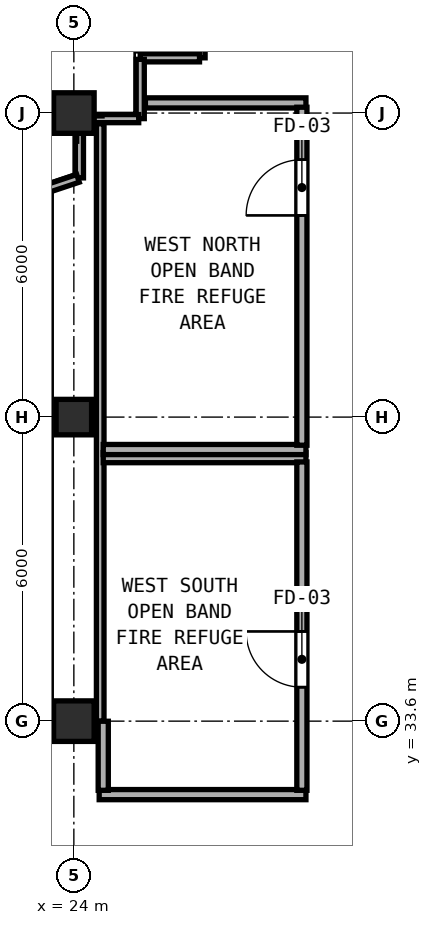
"""IFC4 building model, lengths in metres.
Left out: names, types, materials, properties, quantities, classifications, styles, units other than length and angle.
Written with IfcOpenShell. Run it as: python <this file> out.ifc"""

import sys

from ifc_helpers import new_model, si_unit, direction, frame, frame_2d, origin, origin_2d, place, context, subcontext, project, spatial, rectangle, hollow_rectangle, extrude, element, fill, save


model = new_model("IFC4")
c1 = context("Model", 3, precision=1e-05, world=origin(), true_north=direction((0.0, 1.0)))
c2 = subcontext(c1, "Body", "Model", "MODEL_VIEW")
j1 = project(units=[si_unit("LENGTHUNIT", "METRE"), si_unit("PLANEANGLEUNIT", "RADIAN")], contexts=[c1])
p1 = place(None, origin())
s1 = spatial("IfcSite", under=j1, at=p1, CompositionType="ELEMENT")
p2 = place(p1, origin())
s2 = spatial("IfcBuilding", under=s1, at=p2, CompositionType="ELEMENT")
p3 = place(p2, frame((0.0, 0.0, 277.55)))
s3 = spatial("IfcBuildingStorey", under=s2, at=p3, CompositionType="ELEMENT", Elevation=277.55)
for number, where, z_axis, x_axis in (
    (1, (24.0, 33.6, 0.0), (0.0, 0.0, 1.0), (1.0, 0.0, 0.0)),
    (2, (24.0, 45.6, 0.0), (0.0, 0.0, 1.0), (1.0, 0.0, 0.0)),
):
    element("IfcColumn", number, at=place(p3, frame(where, z_axis=z_axis, x_axis=x_axis)), inside=s3, PredefinedType="COLUMN", context=c2, shape_type="SweptSolid", body=[
        extrude(hollow_rectangle(XDim=0.8, YDim=0.8, WallThickness=0.03, at=origin_2d()), origin(), (0.0, 0.0, 1.0), 4.65),
    ])
p4 = place(p3, frame((24.0, 39.6, 0.0), z_axis=(0.0, 0.0, 1.0), x_axis=(1.0, 0.0, 0.0)))
e3 = element("IfcColumn", 3, at=p4, inside=s3, PredefinedType="COLUMN", context=c2, shape_type="SweptSolid", body=[
    extrude(hollow_rectangle(XDim=0.7, YDim=0.7, WallThickness=0.026, at=origin_2d()), origin(), (0.0, 0.0, 1.0), 4.65),
])
p5 = place(p3, frame((26.51, 47.93, 0.0), z_axis=(0.0, 0.0, 1.0), x_axis=(0.0, -1.0, 0.0)))
e4 = element("IfcWall", 4, at=p5, inside=s3, PredefinedType="PARAPET", context=c2, shape_type="SweptSolid", body=[
    extrude(rectangle(XDim=1.24, YDim=0.16, at=frame_2d((0.62, 0.0))), origin(), (0.0, 0.0, 1.0), 1.15),
])
for number, where, z_axis, x_axis in (
    (5, (26.48, 46.69, 0.0), (0.0, 0.0, 1.0), (-1.0, 0.0, 0.0)),
    (6, (25.31, 46.66, 0.0), (0.0, 0.0, 1.0), (0.0, -1.0, 0.0)),
):
    element("IfcWall", number, at=place(p3, frame(where, z_axis=z_axis, x_axis=x_axis)), inside=s3, PredefinedType="PARAPET", context=c2, shape_type="SweptSolid", body=[
        extrude(rectangle(XDim=1.17, YDim=0.16, at=frame_2d((0.585, 0.0))), origin(), (0.0, 0.0, 1.0), 1.15),
    ])
p6 = place(p3, frame((25.28, 45.49, 0.0), z_axis=(0.0, 0.0, 1.0), x_axis=(-1.0, 0.0, 0.0)))
e7 = element("IfcWall", 7, at=p6, inside=s3, PredefinedType="PARAPET", context=c2, shape_type="SweptSolid", body=[
    extrude(rectangle(XDim=0.888, YDim=0.16, at=frame_2d((0.444, 0.0))), origin(), (0.0, 0.0, 1.0), 1.15),
])
p7 = place(p3, frame((24.11, 45.208, 0.0), z_axis=(0.0, 0.0, 1.0), x_axis=(0.0, -1.0, 0.0)))
e8 = element("IfcWall", 8, at=p7, inside=s3, PredefinedType="PARAPET", context=c2, shape_type="SweptSolid", body=[
    extrude(rectangle(XDim=0.887, YDim=0.16, at=frame_2d((0.444, 0.0))), origin(), (0.0, 0.0, 1.0), 1.15),
])
p8 = place(p3, frame((24.082, 44.311, 0.0), z_axis=(0.0, 0.0, 1.0), x_axis=(-0.948687218335, -0.316216004921, 0.0)))
e9 = element("IfcWall", 9, at=p8, inside=s3, PredefinedType="PARAPET", context=c2, shape_type="SweptSolid", body=[
    extrude(rectangle(XDim=6.228, YDim=0.16, at=frame_2d((3.114, 0.0))), origin(), (0.0, 0.0, 1.0), 1.15),
])
p9 = place(p3, frame((24.52, 33.6, 0.0), z_axis=(0.0, 0.0, 1.0), x_axis=(0.0, 1.0, 0.0)))
e10 = element("IfcWall", 10, at=p9, inside=s3, PredefinedType="PARTITIONING", context=c2, shape_type="SweptSolid", body=[
    extrude(rectangle(XDim=11.788, YDim=0.15, at=frame_2d((5.894, 0.0))), origin(), (0.0, 0.0, 1.0), 4.4),
])
p10 = place(p3, frame((24.58, 38.8, 0.0), z_axis=(0.0, 0.0, 1.0), x_axis=(1.0, 0.0, 0.0)))
e11 = element("IfcWall", 11, at=p10, inside=s3, PredefinedType="SOLIDWALL", context=c2, shape_type="SweptSolid", body=[
    extrude(rectangle(XDim=4.0, YDim=0.2, at=frame_2d((2.0, 0.0))), origin(), (0.0, 0.0, 1.0), 4.4),
])
p11 = place(p3, frame((24.5, 32.15, 0.0), z_axis=(0.0, 0.0, 1.0), x_axis=(1.0, 0.0, 0.0)))
e12 = element("IfcWall", 12, at=p11, inside=s3, PredefinedType="SOLIDWALL", context=c2, shape_type="SweptSolid", body=[
    extrude(rectangle(XDim=4.08, YDim=0.2, at=frame_2d((2.04, 0.0))), origin(), (0.0, 0.0, 1.0), 4.4),
])
p12 = place(p3, frame((24.58, 32.235, 0.0), z_axis=(0.0, 0.0, 1.0), x_axis=(0.0, 1.0, 0.0)))
e13 = element("IfcWall", 13, at=p12, inside=s3, PredefinedType="SOLIDWALL", context=c2, shape_type="SweptSolid", body=[
    extrude(rectangle(XDim=1.363, YDim=0.2, at=frame_2d((0.681, 0.0))), origin(), (0.0, 0.0, 1.0), 4.4),
])
p13 = place(p3, frame((28.5, 32.235, 0.0), z_axis=(0.0, 0.0, 1.0), x_axis=(0.0, 1.0, 0.0)))
e14 = element("IfcWall", 14, at=p13, inside=s3, PredefinedType="SOLIDWALL", context=c2, shape_type="SweptSolid", body=[
    extrude(rectangle(XDim=6.48, YDim=0.2, at=frame_2d((3.24, 0.0))), origin(), (0.0, 0.0, 1.0), 4.4),
])
p14 = place(p13, frame((3.135, 0.0, 0.0), z_axis=(0.0, 0.0, 1.0), x_axis=(-1.0, 0.0, 0.0)))
e15 = element("IfcOpeningElement", 15, at=p14, cuts=e14, PredefinedType="OPENING", context=c2, shape_type="SweptSolid", body=[
    extrude(rectangle(XDim=1.1, YDim=2.15, at=frame_2d((0.55, 1.075))), frame((0.0, 0.11, 0.0), z_axis=(0.0, -1.0, 0.0), x_axis=(1.0, 0.0, 0.0)), (0.0, 0.0, 1.0), 0.22),
])
p15 = place(p3, frame((25.412, 45.8, 0.0), z_axis=(0.0, 0.0, 1.0), x_axis=(1.0, 0.0, 0.0)))
e16 = element("IfcWall", 16, at=p15, inside=s3, PredefinedType="SOLIDWALL", context=c2, shape_type="SweptSolid", body=[
    extrude(rectangle(XDim=3.168, YDim=0.2, at=frame_2d((1.584, 0.0))), origin(), (0.0, 0.0, 1.0), 4.4),
])
p16 = place(p3, frame((24.58, 38.96, 0.0), z_axis=(0.0, 0.0, 1.0), x_axis=(1.0, 0.0, 0.0)))
e17 = element("IfcWall", 17, at=p16, inside=s3, PredefinedType="SOLIDWALL", context=c2, shape_type="SweptSolid", body=[
    extrude(rectangle(XDim=4.0, YDim=0.2, at=frame_2d((2.0, 0.0))), origin(), (0.0, 0.0, 1.0), 4.4),
])
p17 = place(p3, frame((28.5, 39.045, 0.0), z_axis=(0.0, 0.0, 1.0), x_axis=(0.0, 1.0, 0.0)))
e18 = element("IfcWall", 18, at=p17, inside=s3, PredefinedType="SOLIDWALL", context=c2, shape_type="SweptSolid", body=[
    extrude(rectangle(XDim=6.67, YDim=0.2, at=frame_2d((3.335, 0.0))), origin(), (0.0, 0.0, 1.0), 4.4),
])
p18 = place(p17, frame((5.635, 0.0, 0.0), z_axis=(0.0, 0.0, 1.0), x_axis=(-1.0, 0.0, 0.0)))
e19 = element("IfcOpeningElement", 19, at=p18, cuts=e18, PredefinedType="OPENING", context=c2, shape_type="SweptSolid", body=[
    extrude(rectangle(XDim=1.1, YDim=2.15, at=frame_2d((0.55, 1.075))), frame((0.0, 0.11, 0.0), z_axis=(0.0, -1.0, 0.0), x_axis=(1.0, 0.0, 0.0)), (0.0, 0.0, 1.0), 0.22),
])
p19 = place(p14, origin())
e20 = element("IfcDoor", 20, at=p19, inside=s3, OperationType="SINGLE_SWING_LEFT", PredefinedType="DOOR", context=c2, shape_type="SweptSolid", body=[
    extrude(rectangle(XDim=1.1, YDim=2.15, at=frame_2d((0.55, 1.075))), frame((0.0, 0.025, 0.0), z_axis=(0.0, -1.0, 0.0), x_axis=(1.0, 0.0, 0.0)), (0.0, 0.0, 1.0), 0.05),
])
fill(e15, e20)
p20 = place(p18, origin())
e21 = element("IfcDoor", 21, at=p20, inside=s3, OperationType="SINGLE_SWING_RIGHT", PredefinedType="DOOR", context=c2, shape_type="SweptSolid", body=[
    extrude(rectangle(XDim=1.1, YDim=2.15, at=frame_2d((0.55, 1.075))), frame((0.0, 0.025, 0.0), z_axis=(0.0, -1.0, 0.0), x_axis=(1.0, 0.0, 0.0)), (0.0, 0.0, 1.0), 0.05),
])
fill(e19, e21)
save(model, sys.argv[1])
